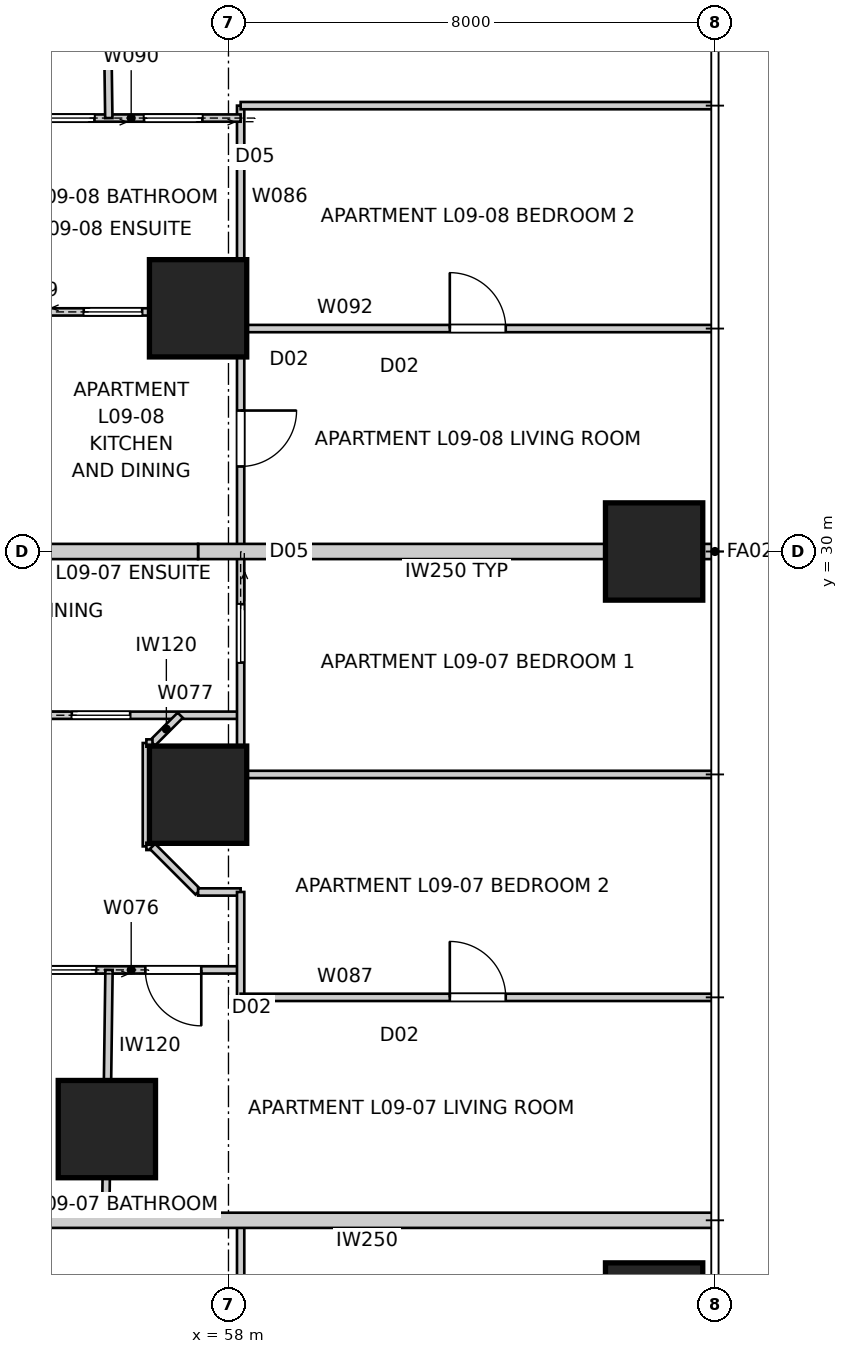
"""IFC4 building model, lengths in metres.
Left out: names, types, materials, properties, quantities, classifications, styles, units other than length and angle.
Written with IfcOpenShell. Run it as: python <this file> out.ifc"""

import sys

from ifc_helpers import new_model, si_unit, direction, frame, frame_2d, origin, origin_2d, place, context, subcontext, project, spatial, rectangle, extrude, element, fill, save


model = new_model("IFC4")
c1 = context("Model", 3, precision=1e-05, world=origin(), true_north=direction((0.0, 1.0)))
c2 = subcontext(c1, "Body", "Model", "MODEL_VIEW")
j1 = project(units=[si_unit("LENGTHUNIT", "METRE"), si_unit("PLANEANGLEUNIT", "RADIAN")], contexts=[c1])
p1 = place(None, origin())
s1 = spatial("IfcSite", under=j1, at=p1, CompositionType="ELEMENT")
p2 = place(p1, origin())
s2 = spatial("IfcBuilding", under=s1, at=p2, CompositionType="ELEMENT")
p3 = place(p2, frame((0.0, 0.0, 35.4)))
s3 = spatial("IfcBuildingStorey", under=s2, at=p3, CompositionType="ELEMENT", Elevation=35.4)
for number, where, z_axis, x_axis in (
    (1, (65.0, 17.5, 0.0), (0.0, 0.0, 1.0), (1.0, 0.0, 0.0)),
    (2, (65.0, 30.0, 0.0), (0.0, 0.0, 1.0), (1.0, 0.0, 0.0)),
    (3, (57.5, 26.0, 0.0), (0.0, 0.0, 1.0), (1.0, 0.0, 0.0)),
    (4, (57.5, 34.0, 0.0), (0.0, 0.0, 1.0), (1.0, 0.0, 0.0)),
    (5, (56.0, 20.5, 0.0), (0.0, 0.0, 1.0), (1.0, 0.0, 0.0)),
):
    element("IfcColumn", number, at=place(p3, frame(where, z_axis=z_axis, x_axis=x_axis)), inside=s3, PredefinedType="COLUMN", context=c2, shape_type="SweptSolid", body=[
        extrude(rectangle(XDim=1.6, YDim=1.6, at=origin_2d()), origin(), (0.0, 0.0, 1.0), 3.4),
    ])
p4 = place(p3, frame((66.0, 19.0, 0.0), z_axis=(0.0, 0.0, 1.0), x_axis=(-1.0, 0.0, 0.0)))
e6 = element("IfcWall", 6, at=p4, inside=s3, PredefinedType="PARTITIONING", context=c2, shape_type="SweptSolid", body=[
    extrude(rectangle(XDim=11.44, YDim=0.25, at=frame_2d((5.72, 0.0))), origin(), (0.0, 0.0, 1.0), 3.25),
])
p5 = place(p3, frame((66.0, 30.0, 0.0), z_axis=(0.0, 0.0, 1.0), x_axis=(-1.0, 0.0, 0.0)))
e7 = element("IfcWall", 7, at=p5, inside=s3, PredefinedType="PARTITIONING", context=c2, shape_type="SweptSolid", body=[
    extrude(rectangle(XDim=8.5, YDim=0.25, at=frame_2d((4.25, 0.0))), origin(), (0.0, 0.0, 1.0), 3.25),
])
p6 = place(p3, frame((57.5, 30.0, 0.0), z_axis=(0.0, 0.0, 1.0), x_axis=(-1.0, 0.0, 0.0)))
e8 = element("IfcWall", 8, at=p6, inside=s3, PredefinedType="PARTITIONING", context=c2, shape_type="SweptSolid", body=[
    extrude(rectangle(XDim=2.94, YDim=0.25, at=frame_2d((1.47, 0.0))), origin(), (0.0, 0.0, 1.0), 2.796),
])
p7 = place(p3, frame((58.2, 19.0, 0.0), z_axis=(0.0, 0.0, 1.0), x_axis=(0.0, -1.0, 0.0)))
e9 = element("IfcWall", 9, at=p7, inside=s3, PredefinedType="PARTITIONING", context=c2, shape_type="SweptSolid", body=[
    extrude(rectangle(XDim=7.2, YDim=0.12, at=frame_2d((3.6, 0.0))), origin(), (0.0, 0.0, 1.0), 3.25),
])
p8 = place(p7, frame((4.54, 0.0, 0.0)))
e10 = element("IfcOpeningElement", 10, at=p8, cuts=e9, PredefinedType="OPENING", context=c2, shape_type="SweptSolid", body=[
    extrude(rectangle(XDim=0.92, YDim=2.34, at=frame_2d((0.46, 1.17))), frame((0.0, 0.07, 0.0), z_axis=(0.0, -1.0, 0.0), x_axis=(1.0, 0.0, 0.0)), (0.0, 0.0, 1.0), 0.14),
])
p9 = place(p3, frame((58.2, 23.118, 0.0), z_axis=(0.0, 0.0, 1.0), x_axis=(-1.0, 0.0, 0.0)))
e11 = element("IfcWall", 11, at=p9, inside=s3, PredefinedType="PARTITIONING", context=c2, shape_type="SweptSolid", body=[
    extrude(rectangle(XDim=3.6, YDim=0.12, at=frame_2d((1.8, 0.0))), origin(), (0.0, 0.0, 1.0), 3.25),
])
p10 = place(p9, frame((0.647, 0.0, 0.0)))
e12 = element("IfcOpeningElement", 12, at=p10, cuts=e11, PredefinedType="OPENING", context=c2, shape_type="SweptSolid", body=[
    extrude(rectangle(XDim=0.92, YDim=2.34, at=frame_2d((0.46, 1.17))), frame((0.0, 0.07, 0.0), z_axis=(0.0, -1.0, 0.0), x_axis=(1.0, 0.0, 0.0)), (0.0, 0.0, 1.0), 0.14),
])
p11 = place(p9, frame((2.377, 0.0, 0.0)))
e13 = element("IfcOpeningElement", 13, at=p11, cuts=e11, PredefinedType="OPENING", context=c2, shape_type="SweptSolid", body=[
    extrude(rectangle(XDim=0.96, YDim=2.1, at=frame_2d((0.48, 1.05))), frame((0.0, 0.07, 0.0), z_axis=(0.0, -1.0, 0.0), x_axis=(1.0, 0.0, 0.0)), (0.0, 0.0, 1.0), 0.14),
])
p12 = place(p3, frame((54.6, 27.307, 0.0), z_axis=(0.0, 0.0, 1.0), x_axis=(1.0, 0.0, 0.0)))
e14 = element("IfcWall", 14, at=p12, inside=s3, PredefinedType="PARTITIONING", context=c2, shape_type="SweptSolid", body=[
    extrude(rectangle(XDim=3.6, YDim=0.12, at=frame_2d((1.8, 0.0))), origin(), (0.0, 0.0, 1.0), 3.25),
])
p13 = place(p12, frame((0.823, 0.0, 0.0)))
e15 = element("IfcOpeningElement", 15, at=p13, cuts=e14, PredefinedType="OPENING", context=c2, shape_type="SweptSolid", body=[
    extrude(rectangle(XDim=0.96, YDim=2.1, at=frame_2d((0.48, 1.05))), frame((0.0, 0.07, 0.0), z_axis=(0.0, -1.0, 0.0), x_axis=(1.0, 0.0, 0.0)), (0.0, 0.0, 1.0), 0.14),
])
p14 = place(p3, frame((57.207, 27.307, 0.0), z_axis=(0.0, 0.0, 1.0), x_axis=(-0.707295771362, -0.706917740485, 0.0)))
e16 = element("IfcWall", 16, at=p14, inside=s3, PredefinedType="PARTITIONING", context=c2, shape_type="SweptSolid", body=[
    extrude(rectangle(XDim=0.646, YDim=0.12, at=frame_2d((0.323, 0.0))), origin(), (0.0, 0.0, 1.0), 3.25),
])
p15 = place(p3, frame((56.65, 26.85, 0.0), z_axis=(0.0, 0.0, 1.0), x_axis=(0.0, -1.0, 0.0)))
e17 = element("IfcWall", 17, at=p15, inside=s3, PredefinedType="PARTITIONING", context=c2, shape_type="SweptSolid", body=[
    extrude(rectangle(XDim=1.7, YDim=0.12, at=frame_2d((0.85, 0.0))), origin(), (0.0, 0.0, 1.0), 3.25),
])
p16 = place(p3, frame((56.75, 25.15, 0.0), z_axis=(0.0, 0.0, 1.0), x_axis=(0.707106781187, -0.707106781187, 0.0)))
e18 = element("IfcWall", 18, at=p16, inside=s3, PredefinedType="PARTITIONING", context=c2, shape_type="SweptSolid", body=[
    extrude(rectangle(XDim=1.061, YDim=0.12, at=frame_2d((0.53, 0.0))), origin(), (0.0, 0.0, 1.0), 3.25),
])
p17 = place(p3, frame((57.5, 24.4, 0.0), z_axis=(0.0, 0.0, 1.0), x_axis=(1.0, 0.0, 0.0)))
e19 = element("IfcWall", 19, at=p17, inside=s3, PredefinedType="PARTITIONING", context=c2, shape_type="SweptSolid", body=[
    extrude(rectangle(XDim=0.7, YDim=0.12, at=frame_2d((0.35, 0.0))), origin(), (0.0, 0.0, 1.0), 3.25),
])
p18 = place(p3, frame((58.2, 24.4, 0.0), z_axis=(0.0, 0.0, 1.0), x_axis=(0.0, -1.0, 0.0)))
e20 = element("IfcWall", 20, at=p18, inside=s3, PredefinedType="PARTITIONING", context=c2, shape_type="SweptSolid", body=[
    extrude(rectangle(XDim=1.733, YDim=0.12, at=frame_2d((0.867, 0.0))), origin(), (0.0, 0.0, 1.0), 3.25),
])
p19 = place(p3, frame((56.035, 23.118, 0.0), z_axis=(0.0, 0.0, 1.0), x_axis=(-0.013455418228, -0.999909471762, 0.0)))
e21 = element("IfcWall", 21, at=p19, inside=s3, PredefinedType="PARTITIONING", context=c2, shape_type="SweptSolid", body=[
    extrude(rectangle(XDim=4.119, YDim=0.12, at=frame_2d((2.06, 0.0))), origin(), (0.0, 0.0, 1.0), 2.549),
])
p20 = place(p3, frame((58.2, 37.333, 0.0), z_axis=(0.0, 0.0, 1.0), x_axis=(0.0, -1.0, 0.0)))
e22 = element("IfcWall", 22, at=p20, inside=s3, PredefinedType="PARTITIONING", context=c2, shape_type="SweptSolid", body=[
    extrude(rectangle(XDim=11.0, YDim=0.12, at=frame_2d((5.5, 0.0))), origin(), (0.0, 0.0, 1.0), 3.25),
])
p21 = place(p20, frame((5.015, 0.0, 0.0)))
e23 = element("IfcOpeningElement", 23, at=p21, cuts=e22, PredefinedType="OPENING", context=c2, shape_type="SweptSolid", body=[
    extrude(rectangle(XDim=0.92, YDim=2.34, at=frame_2d((0.46, 1.17))), frame((0.0, 0.07, 0.0), z_axis=(0.0, -1.0, 0.0), x_axis=(1.0, 0.0, 0.0)), (0.0, 0.0, 1.0), 0.14),
])
p22 = place(p20, frame((8.2, 0.0, 0.0)))
e24 = element("IfcOpeningElement", 24, at=p22, cuts=e22, PredefinedType="OPENING", context=c2, shape_type="SweptSolid", body=[
    extrude(rectangle(XDim=0.96, YDim=2.1, at=frame_2d((0.48, 1.05))), frame((0.0, 0.07, 0.0), z_axis=(0.0, -1.0, 0.0), x_axis=(1.0, 0.0, 0.0)), (0.0, 0.0, 1.0), 0.14),
])
p23 = place(p3, frame((58.2, 22.667, 0.0), z_axis=(0.0, 0.0, 1.0), x_axis=(1.0, 0.0, 0.0)))
e25 = element("IfcWall", 25, at=p23, inside=s3, PredefinedType="PARTITIONING", context=c2, shape_type="SweptSolid", body=[
    extrude(rectangle(XDim=7.76, YDim=0.12, at=frame_2d((3.88, 0.0))), origin(), (0.0, 0.0, 1.0), 3.25),
])
p24 = place(p23, frame((3.44, 0.0, 0.0)))
e26 = element("IfcOpeningElement", 26, at=p24, cuts=e25, PredefinedType="OPENING", context=c2, shape_type="SweptSolid", body=[
    extrude(rectangle(XDim=0.92, YDim=2.34, at=frame_2d((0.46, 1.17))), frame((0.0, 0.07, 0.0), z_axis=(0.0, -1.0, 0.0), x_axis=(1.0, 0.0, 0.0)), (0.0, 0.0, 1.0), 0.14),
])
p25 = place(p3, frame((65.96, 26.333, 0.0), z_axis=(0.0, 0.0, 1.0), x_axis=(-1.0, 0.0, 0.0)))
e27 = element("IfcWall", 27, at=p25, inside=s3, PredefinedType="PARTITIONING", context=c2, shape_type="SweptSolid", body=[
    extrude(rectangle(XDim=7.76, YDim=0.12, at=frame_2d((3.88, 0.0))), origin(), (0.0, 0.0, 1.0), 3.25),
])
p26 = place(p3, frame((54.6, 33.94, 0.0), z_axis=(0.0, 0.0, 1.0), x_axis=(1.0, 0.0, 0.0)))
e28 = element("IfcWall", 28, at=p26, inside=s3, PredefinedType="PARTITIONING", context=c2, shape_type="SweptSolid", body=[
    extrude(rectangle(XDim=3.6, YDim=0.12, at=frame_2d((1.8, 0.0))), origin(), (0.0, 0.0, 1.0), 3.25),
])
p27 = place(p26, frame((1.02, 0.0, 0.0)))
e29 = element("IfcOpeningElement", 29, at=p27, cuts=e28, PredefinedType="OPENING", context=c2, shape_type="SweptSolid", body=[
    extrude(rectangle(XDim=0.96, YDim=2.1, at=frame_2d((0.48, 1.05))), frame((0.0, 0.07, 0.0), z_axis=(0.0, -1.0, 0.0), x_axis=(1.0, 0.0, 0.0)), (0.0, 0.0, 1.0), 0.14),
])
p28 = place(p3, frame((58.2, 37.129, 0.0), z_axis=(0.0, 0.0, 1.0), x_axis=(-1.0, 0.0, 0.0)))
e30 = element("IfcWall", 30, at=p28, inside=s3, PredefinedType="PARTITIONING", context=c2, shape_type="SweptSolid", body=[
    extrude(rectangle(XDim=3.6, YDim=0.12, at=frame_2d((1.8, 0.0))), origin(), (0.0, 0.0, 1.0), 3.25),
])
p29 = place(p28, frame((0.629, 0.0, 0.0)))
e31 = element("IfcOpeningElement", 31, at=p29, cuts=e30, PredefinedType="OPENING", context=c2, shape_type="SweptSolid", body=[
    extrude(rectangle(XDim=0.96, YDim=2.1, at=frame_2d((0.48, 1.05))), frame((0.0, 0.07, 0.0), z_axis=(0.0, -1.0, 0.0), x_axis=(1.0, 0.0, 0.0)), (0.0, 0.0, 1.0), 0.14),
])
p30 = place(p28, frame((2.404, 0.0, 0.0)))
e32 = element("IfcOpeningElement", 32, at=p30, cuts=e30, PredefinedType="OPENING", context=c2, shape_type="SweptSolid", body=[
    extrude(rectangle(XDim=0.96, YDim=2.1, at=frame_2d((0.48, 1.05))), frame((0.0, 0.07, 0.0), z_axis=(0.0, -1.0, 0.0), x_axis=(1.0, 0.0, 0.0)), (0.0, 0.0, 1.0), 0.14),
])
p31 = place(p3, frame((55.98, 41.0, 0.0), z_axis=(0.0, 0.0, 1.0), x_axis=(0.013494388256, -0.999908946597, 0.0)))
e33 = element("IfcWall", 33, at=p31, inside=s3, PredefinedType="PARTITIONING", context=c2, shape_type="SweptSolid", body=[
    extrude(rectangle(XDim=3.872, YDim=0.12, at=frame_2d((1.936, 0.0))), origin(), (0.0, 0.0, 1.0), 2.549),
])
p32 = place(p3, frame((58.2, 33.667, 0.0), z_axis=(0.0, 0.0, 1.0), x_axis=(1.0, 0.0, 0.0)))
e34 = element("IfcWall", 34, at=p32, inside=s3, PredefinedType="PARTITIONING", context=c2, shape_type="SweptSolid", body=[
    extrude(rectangle(XDim=7.76, YDim=0.12, at=frame_2d((3.88, 0.0))), origin(), (0.0, 0.0, 1.0), 3.25),
])
p33 = place(p32, frame((3.44, 0.0, 0.0)))
e35 = element("IfcOpeningElement", 35, at=p33, cuts=e34, PredefinedType="OPENING", context=c2, shape_type="SweptSolid", body=[
    extrude(rectangle(XDim=0.92, YDim=2.34, at=frame_2d((0.46, 1.17))), frame((0.0, 0.07, 0.0), z_axis=(0.0, -1.0, 0.0), x_axis=(1.0, 0.0, 0.0)), (0.0, 0.0, 1.0), 0.14),
])
p34 = place(p3, frame((65.96, 37.333, 0.0), z_axis=(0.0, 0.0, 1.0), x_axis=(-1.0, 0.0, 0.0)))
e36 = element("IfcWall", 36, at=p34, inside=s3, PredefinedType="PARTITIONING", context=c2, shape_type="SweptSolid", body=[
    extrude(rectangle(XDim=7.76, YDim=0.12, at=frame_2d((3.88, 0.0))), origin(), (0.0, 0.0, 1.0), 3.25),
])
for number, where, z_axis, x_axis in (
    (37, (56.65, 26.85, 0.0), (0.0, 0.0, 1.0), (1.0, 0.0, 0.0)),
    (38, (56.65, 25.15, 0.0), (0.0, 0.0, 1.0), (1.0, 0.0, 0.0)),
):
    element("IfcWall", number, at=place(p3, frame(where, z_axis=z_axis, x_axis=x_axis)), inside=s3, PredefinedType="PARTITIONING", context=c2, shape_type="SweptSolid", body=[
        extrude(rectangle(XDim=0.1, YDim=0.12, at=frame_2d((0.05, 0.0))), origin(), (0.0, 0.0, 1.0), 3.25),
    ])
p35 = place(p13, origin())
e39 = element("IfcDoor", 39, at=p35, inside=s3, OperationType="SLIDING_TO_LEFT", PredefinedType="DOOR", context=c2, shape_type="SweptSolid", body=[
    extrude(rectangle(XDim=0.96, YDim=2.1, at=frame_2d((0.48, 1.05))), frame((0.0, 0.025, 0.0), z_axis=(0.0, -1.0, 0.0), x_axis=(1.0, 0.0, 0.0)), (0.0, 0.0, 1.0), 0.05),
])
fill(e15, e39)
p36 = place(p10, origin())
e40 = element("IfcDoor", 40, at=p36, inside=s3, OperationType="SINGLE_SWING_LEFT", PredefinedType="DOOR", context=c2, shape_type="SweptSolid", body=[
    extrude(rectangle(XDim=0.92, YDim=2.34, at=frame_2d((0.46, 1.17))), frame((0.0, 0.025, 0.0), z_axis=(0.0, -1.0, 0.0), x_axis=(1.0, 0.0, 0.0)), (0.0, 0.0, 1.0), 0.05),
])
fill(e12, e40)
p37 = place(p11, origin())
e41 = element("IfcDoor", 41, at=p37, inside=s3, OperationType="SLIDING_TO_LEFT", PredefinedType="DOOR", context=c2, shape_type="SweptSolid", body=[
    extrude(rectangle(XDim=0.96, YDim=2.1, at=frame_2d((0.48, 1.05))), frame((0.0, 0.025, 0.0), z_axis=(0.0, -1.0, 0.0), x_axis=(1.0, 0.0, 0.0)), (0.0, 0.0, 1.0), 0.05),
])
fill(e13, e41)
p38 = place(p21, origin())
e42 = element("IfcDoor", 42, at=p38, inside=s3, OperationType="SINGLE_SWING_LEFT", PredefinedType="DOOR", context=c2, shape_type="SweptSolid", body=[
    extrude(rectangle(XDim=0.92, YDim=2.34, at=frame_2d((0.46, 1.17))), frame((0.0, 0.025, 0.0), z_axis=(0.0, -1.0, 0.0), x_axis=(1.0, 0.0, 0.0)), (0.0, 0.0, 1.0), 0.05),
])
fill(e23, e42)
p39 = place(p27, origin())
e43 = element("IfcDoor", 43, at=p39, inside=s3, OperationType="SLIDING_TO_LEFT", PredefinedType="DOOR", context=c2, shape_type="SweptSolid", body=[
    extrude(rectangle(XDim=0.96, YDim=2.1, at=frame_2d((0.48, 1.05))), frame((0.0, 0.025, 0.0), z_axis=(0.0, -1.0, 0.0), x_axis=(1.0, 0.0, 0.0)), (0.0, 0.0, 1.0), 0.05),
])
fill(e29, e43)
p40 = place(p22, origin())
e44 = element("IfcDoor", 44, at=p40, inside=s3, OperationType="SLIDING_TO_LEFT", PredefinedType="DOOR", context=c2, shape_type="SweptSolid", body=[
    extrude(rectangle(XDim=0.96, YDim=2.1, at=frame_2d((0.48, 1.05))), frame((0.0, 0.025, 0.0), z_axis=(0.0, -1.0, 0.0), x_axis=(1.0, 0.0, 0.0)), (0.0, 0.0, 1.0), 0.05),
])
fill(e24, e44)
p41 = place(p24, origin())
e45 = element("IfcDoor", 45, at=p41, inside=s3, OperationType="SINGLE_SWING_LEFT", PredefinedType="DOOR", context=c2, shape_type="SweptSolid", body=[
    extrude(rectangle(XDim=0.92, YDim=2.34, at=frame_2d((0.46, 1.17))), frame((0.0, 0.025, 0.0), z_axis=(0.0, -1.0, 0.0), x_axis=(1.0, 0.0, 0.0)), (0.0, 0.0, 1.0), 0.05),
])
fill(e26, e45)
p42 = place(p33, origin())
e46 = element("IfcDoor", 46, at=p42, inside=s3, OperationType="SINGLE_SWING_LEFT", PredefinedType="DOOR", context=c2, shape_type="SweptSolid", body=[
    extrude(rectangle(XDim=0.92, YDim=2.34, at=frame_2d((0.46, 1.17))), frame((0.0, 0.025, 0.0), z_axis=(0.0, -1.0, 0.0), x_axis=(1.0, 0.0, 0.0)), (0.0, 0.0, 1.0), 0.05),
])
fill(e35, e46)
p43 = place(p29, origin())
e47 = element("IfcDoor", 47, at=p43, inside=s3, OperationType="SLIDING_TO_LEFT", PredefinedType="DOOR", context=c2, shape_type="SweptSolid", body=[
    extrude(rectangle(XDim=0.96, YDim=2.1, at=frame_2d((0.48, 1.05))), frame((0.0, 0.025, 0.0), z_axis=(0.0, -1.0, 0.0), x_axis=(1.0, 0.0, 0.0)), (0.0, 0.0, 1.0), 0.05),
])
fill(e31, e47)
p44 = place(p30, origin())
e48 = element("IfcDoor", 48, at=p44, inside=s3, OperationType="SLIDING_TO_LEFT", PredefinedType="DOOR", context=c2, shape_type="SweptSolid", body=[
    extrude(rectangle(XDim=0.96, YDim=2.1, at=frame_2d((0.48, 1.05))), frame((0.0, 0.025, 0.0), z_axis=(0.0, -1.0, 0.0), x_axis=(1.0, 0.0, 0.0)), (0.0, 0.0, 1.0), 0.05),
])
fill(e32, e48)
save(model, sys.argv[1])
